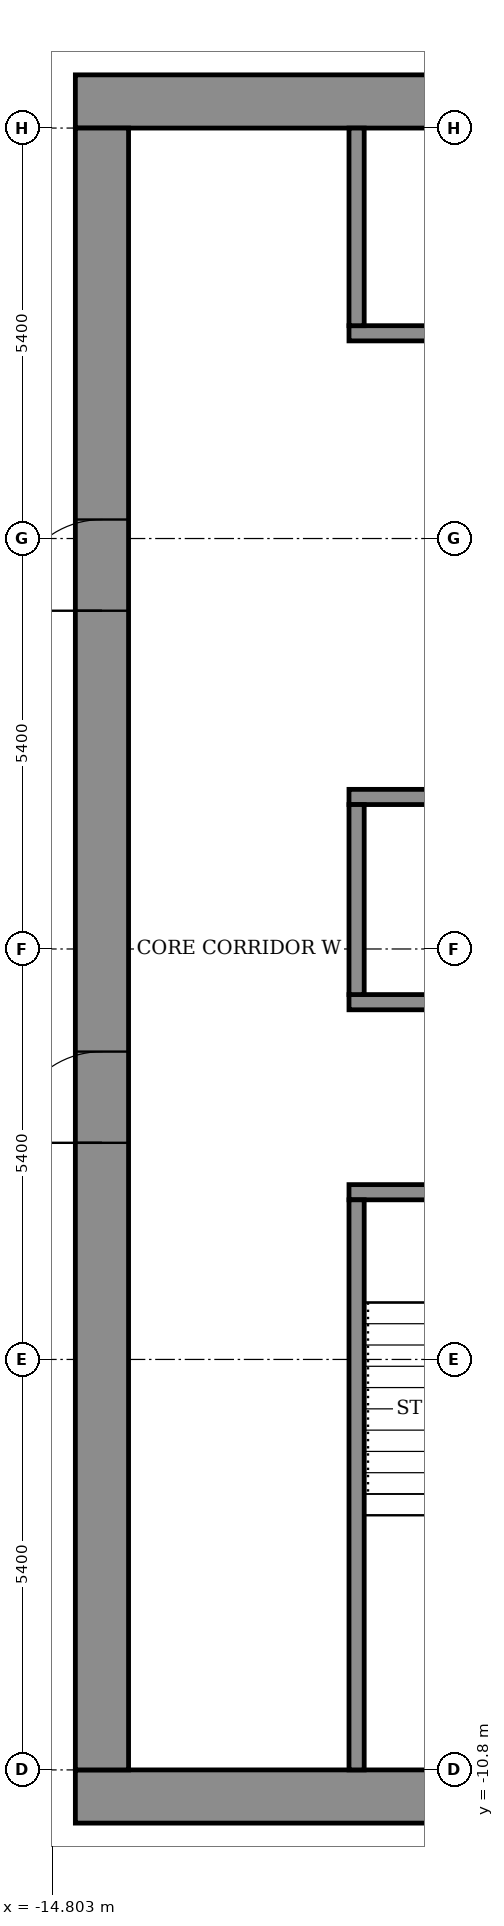
"""IFC4 building model, lengths in metres.
Left out: names, types, materials, properties, quantities, classifications, styles, units other than length and angle.
Written with IfcOpenShell. Run it as: python <this file> out.ifc"""

import sys

from ifc_helpers import new_model, si_unit, direction, frame, frame_2d, origin, place, context, subcontext, project, spatial, rectangle, extrude, element, fill, save


model = new_model("IFC4")
c1 = context("Model", 3, precision=1e-05, world=origin(), true_north=direction((0.0, 1.0)))
c2 = subcontext(c1, "Body", "Model", "MODEL_VIEW")
j1 = project(units=[si_unit("LENGTHUNIT", "METRE"), si_unit("PLANEANGLEUNIT", "RADIAN")], contexts=[c1])
p1 = place(None, origin())
s1 = spatial("IfcSite", under=j1, at=p1, CompositionType="ELEMENT")
p2 = place(p1, origin())
s2 = spatial("IfcBuilding", under=s1, at=p2, CompositionType="ELEMENT")
p3 = place(p2, frame((0.0, 0.0, 271.7)))
s3 = spatial("IfcBuildingStorey", under=s2, at=p3, CompositionType="ELEMENT", Elevation=271.7)
for number, where, z_axis, x_axis in (
    (1, (-14.5, -11.15, 0.0), (0.0, 0.0, 1.0), (1.0, 0.0, 0.0)),
    (2, (-14.5, 11.15, 0.0), (0.0, 0.0, 1.0), (1.0, 0.0, 0.0)),
):
    element("IfcWall", number, at=place(p3, frame(where, z_axis=z_axis, x_axis=x_axis)), inside=s3, PredefinedType="SHEAR", context=c2, shape_type="SweptSolid", body=[
        extrude(rectangle(XDim=29.0, YDim=0.7, at=frame_2d((14.5, 0.0))), origin(), (0.0, 0.0, 1.0), 3.6),
    ])
p4 = place(p3, frame((-14.15, -10.8, 0.0), z_axis=(0.0, 0.0, 1.0), x_axis=(0.0, 1.0, 0.0)))
e3 = element("IfcWall", 3, at=p4, inside=s3, PredefinedType="SHEAR", context=c2, shape_type="SweptSolid", body=[
    extrude(rectangle(XDim=21.6, YDim=0.7, at=frame_2d((10.8, 0.0))), origin(), (0.0, 0.0, 1.0), 3.6),
])
p5 = place(p4, frame((8.25, 0.0, 0.0)))
e4 = element("IfcOpeningElement", 4, at=p5, cuts=e3, PredefinedType="OPENING", context=c2, shape_type="SweptSolid", body=[
    extrude(rectangle(XDim=1.2, YDim=2.1, at=frame_2d((0.6, 1.05))), frame((0.0, 0.36, 0.0), z_axis=(0.0, -1.0, 0.0), x_axis=(1.0, 0.0, 0.0)), (0.0, 0.0, 1.0), 0.72),
])
p6 = place(p4, frame((15.25, 0.0, 0.0)))
e5 = element("IfcOpeningElement", 5, at=p6, cuts=e3, PredefinedType="OPENING", context=c2, shape_type="SweptSolid", body=[
    extrude(rectangle(XDim=1.2, YDim=2.1, at=frame_2d((0.6, 1.05))), frame((0.0, 0.36, 0.0), z_axis=(0.0, -1.0, 0.0), x_axis=(1.0, 0.0, 0.0)), (0.0, 0.0, 1.0), 0.72),
])
p7 = place(p3, frame((-10.9, -3.2, 0.0), z_axis=(0.0, 0.0, 1.0), x_axis=(1.0, 0.0, 0.0)))
e6 = element("IfcWall", 6, at=p7, inside=s3, PredefinedType="SHEAR", context=c2, shape_type="SweptSolid", body=[
    extrude(rectangle(XDim=21.8, YDim=0.2, at=frame_2d((10.9, 0.0))), origin(), (0.0, 0.0, 1.0), 3.05),
])
p8 = place(p7, frame((1.075, 0.0, 0.0)))
e7 = element("IfcOpeningElement", 7, at=p8, cuts=e6, PredefinedType="OPENING", context=c2, shape_type="SweptSolid", body=[
    extrude(rectangle(XDim=1.1, YDim=2.1, at=frame_2d((0.55, 1.05))), frame((0.0, 0.11, 0.0), z_axis=(0.0, -1.0, 0.0), x_axis=(1.0, 0.0, 0.0)), (0.0, 0.0, 1.0), 0.22),
])
p9 = place(p7, frame((10.325, 0.0, 0.0)))
e8 = element("IfcOpeningElement", 8, at=p9, cuts=e6, PredefinedType="OPENING", context=c2, shape_type="SweptSolid", body=[
    extrude(rectangle(XDim=1.1, YDim=2.1, at=frame_2d((0.55, 1.05))), frame((0.0, 0.11, 0.0), z_axis=(0.0, -1.0, 0.0), x_axis=(1.0, 0.0, 0.0)), (0.0, 0.0, 1.0), 0.22),
])
p10 = place(p7, frame((19.625, 0.0, 0.0)))
e9 = element("IfcOpeningElement", 9, at=p10, cuts=e6, PredefinedType="OPENING", context=c2, shape_type="SweptSolid", body=[
    extrude(rectangle(XDim=1.1, YDim=2.1, at=frame_2d((0.55, 1.05))), frame((0.0, 0.11, 0.0), z_axis=(0.0, -1.0, 0.0), x_axis=(1.0, 0.0, 0.0)), (0.0, 0.0, 1.0), 0.22),
])
p11 = place(p7, frame((5.7, 0.0, 0.0)))
e10 = element("IfcOpeningElement", 10, at=p11, cuts=e6, PredefinedType="OPENING", context=c2, shape_type="SweptSolid", body=[
    extrude(rectangle(XDim=1.1, YDim=2.1, at=frame_2d((0.55, 1.05))), frame((0.0, 0.11, 0.0), z_axis=(0.0, -1.0, 0.0), x_axis=(1.0, 0.0, 0.0)), (0.0, 0.0, 1.0), 0.22),
])
p12 = place(p7, frame((14.975, 0.0, 0.0)))
e11 = element("IfcOpeningElement", 11, at=p12, cuts=e6, PredefinedType="OPENING", context=c2, shape_type="SweptSolid", body=[
    extrude(rectangle(XDim=1.1, YDim=2.1, at=frame_2d((0.55, 1.05))), frame((0.0, 0.11, 0.0), z_axis=(0.0, -1.0, 0.0), x_axis=(1.0, 0.0, 0.0)), (0.0, 0.0, 1.0), 0.22),
])
p13 = place(p3, frame((-10.9, -0.7, 0.0), z_axis=(0.0, 0.0, 1.0), x_axis=(1.0, 0.0, 0.0)))
e12 = element("IfcWall", 12, at=p13, inside=s3, PredefinedType="SHEAR", context=c2, shape_type="SweptSolid", body=[
    extrude(rectangle(XDim=21.8, YDim=0.2, at=frame_2d((10.9, 0.0))), origin(), (0.0, 0.0, 1.0), 3.05),
])
p14 = place(p3, frame((-10.9, 2.0, 0.0), z_axis=(0.0, 0.0, 1.0), x_axis=(1.0, 0.0, 0.0)))
e13 = element("IfcWall", 13, at=p14, inside=s3, PredefinedType="SHEAR", context=c2, shape_type="SweptSolid", body=[
    extrude(rectangle(XDim=21.8, YDim=0.2, at=frame_2d((10.9, 0.0))), origin(), (0.0, 0.0, 1.0), 3.05),
])
p15 = place(p14, frame((4.95, 0.0, 0.0)))
e14 = element("IfcOpeningElement", 14, at=p15, cuts=e13, PredefinedType="OPENING", context=c2, shape_type="SweptSolid", body=[
    extrude(rectangle(XDim=1.1, YDim=2.1, at=frame_2d((0.55, 1.05))), frame((0.0, 0.11, 0.0), z_axis=(0.0, -1.0, 0.0), x_axis=(1.0, 0.0, 0.0)), (0.0, 0.0, 1.0), 0.22),
])
p16 = place(p14, frame((7.65, 0.0, 0.0)))
e15 = element("IfcOpeningElement", 15, at=p16, cuts=e13, PredefinedType="OPENING", context=c2, shape_type="SweptSolid", body=[
    extrude(rectangle(XDim=1.1, YDim=2.1, at=frame_2d((0.55, 1.05))), frame((0.0, 0.11, 0.0), z_axis=(0.0, -1.0, 0.0), x_axis=(1.0, 0.0, 0.0)), (0.0, 0.0, 1.0), 0.22),
])
p17 = place(p14, frame((10.35, 0.0, 0.0)))
e16 = element("IfcOpeningElement", 16, at=p17, cuts=e13, PredefinedType="OPENING", context=c2, shape_type="SweptSolid", body=[
    extrude(rectangle(XDim=1.1, YDim=2.1, at=frame_2d((0.55, 1.05))), frame((0.0, 0.11, 0.0), z_axis=(0.0, -1.0, 0.0), x_axis=(1.0, 0.0, 0.0)), (0.0, 0.0, 1.0), 0.22),
])
p18 = place(p14, frame((1.675, 0.0, 0.0)))
e17 = element("IfcOpeningElement", 17, at=p18, cuts=e13, PredefinedType="OPENING", context=c2, shape_type="SweptSolid", body=[
    extrude(rectangle(XDim=0.9, YDim=2.1, at=frame_2d((0.45, 1.05))), frame((0.0, 0.11, 0.0), z_axis=(0.0, -1.0, 0.0), x_axis=(1.0, 0.0, 0.0)), (0.0, 0.0, 1.0), 0.22),
])
p19 = place(p14, frame((13.825, 0.0, 0.0)))
e18 = element("IfcOpeningElement", 18, at=p19, cuts=e13, PredefinedType="OPENING", context=c2, shape_type="SweptSolid", body=[
    extrude(rectangle(XDim=0.9, YDim=2.1, at=frame_2d((0.45, 1.05))), frame((0.0, 0.11, 0.0), z_axis=(0.0, -1.0, 0.0), x_axis=(1.0, 0.0, 0.0)), (0.0, 0.0, 1.0), 0.22),
])
p20 = place(p14, frame((18.55, 0.0, 0.0)))
e19 = element("IfcOpeningElement", 19, at=p20, cuts=e13, PredefinedType="OPENING", context=c2, shape_type="SweptSolid", body=[
    extrude(rectangle(XDim=0.9, YDim=2.1, at=frame_2d((0.45, 1.05))), frame((0.0, 0.11, 0.0), z_axis=(0.0, -1.0, 0.0), x_axis=(1.0, 0.0, 0.0)), (0.0, 0.0, 1.0), 0.22),
])
p21 = place(p3, frame((-10.9, 8.1, 0.0), z_axis=(0.0, 0.0, 1.0), x_axis=(1.0, 0.0, 0.0)))
e20 = element("IfcWall", 20, at=p21, inside=s3, PredefinedType="SHEAR", context=c2, shape_type="SweptSolid", body=[
    extrude(rectangle(XDim=21.8, YDim=0.2, at=frame_2d((10.9, 0.0))), origin(), (0.0, 0.0, 1.0), 3.05),
])
p22 = place(p21, frame((4.95, 0.0, 0.0)))
e21 = element("IfcOpeningElement", 21, at=p22, cuts=e20, PredefinedType="OPENING", context=c2, shape_type="SweptSolid", body=[
    extrude(rectangle(XDim=1.1, YDim=2.1, at=frame_2d((0.55, 1.05))), frame((0.0, 0.11, 0.0), z_axis=(0.0, -1.0, 0.0), x_axis=(1.0, 0.0, 0.0)), (0.0, 0.0, 1.0), 0.22),
])
p23 = place(p21, frame((7.65, 0.0, 0.0)))
e22 = element("IfcOpeningElement", 22, at=p23, cuts=e20, PredefinedType="OPENING", context=c2, shape_type="SweptSolid", body=[
    extrude(rectangle(XDim=1.1, YDim=2.1, at=frame_2d((0.55, 1.05))), frame((0.0, 0.11, 0.0), z_axis=(0.0, -1.0, 0.0), x_axis=(1.0, 0.0, 0.0)), (0.0, 0.0, 1.0), 0.22),
])
p24 = place(p21, frame((10.35, 0.0, 0.0)))
e23 = element("IfcOpeningElement", 23, at=p24, cuts=e20, PredefinedType="OPENING", context=c2, shape_type="SweptSolid", body=[
    extrude(rectangle(XDim=1.1, YDim=2.1, at=frame_2d((0.55, 1.05))), frame((0.0, 0.11, 0.0), z_axis=(0.0, -1.0, 0.0), x_axis=(1.0, 0.0, 0.0)), (0.0, 0.0, 1.0), 0.22),
])
p25 = place(p21, frame((1.675, 0.0, 0.0)))
e24 = element("IfcOpeningElement", 24, at=p25, cuts=e20, PredefinedType="OPENING", context=c2, shape_type="SweptSolid", body=[
    extrude(rectangle(XDim=0.9, YDim=2.1, at=frame_2d((0.45, 1.05))), frame((0.0, 0.11, 0.0), z_axis=(0.0, -1.0, 0.0), x_axis=(1.0, 0.0, 0.0)), (0.0, 0.0, 1.0), 0.22),
])
p26 = place(p21, frame((13.825, 0.0, 0.0)))
e25 = element("IfcOpeningElement", 25, at=p26, cuts=e20, PredefinedType="OPENING", context=c2, shape_type="SweptSolid", body=[
    extrude(rectangle(XDim=0.9, YDim=2.1, at=frame_2d((0.45, 1.05))), frame((0.0, 0.11, 0.0), z_axis=(0.0, -1.0, 0.0), x_axis=(1.0, 0.0, 0.0)), (0.0, 0.0, 1.0), 0.22),
])
p27 = place(p21, frame((18.55, 0.0, 0.0)))
e26 = element("IfcOpeningElement", 26, at=p27, cuts=e20, PredefinedType="OPENING", context=c2, shape_type="SweptSolid", body=[
    extrude(rectangle(XDim=0.9, YDim=2.1, at=frame_2d((0.45, 1.05))), frame((0.0, 0.11, 0.0), z_axis=(0.0, -1.0, 0.0), x_axis=(1.0, 0.0, 0.0)), (0.0, 0.0, 1.0), 0.22),
])
p28 = place(p3, frame((-10.8, -10.8, 0.0), z_axis=(0.0, 0.0, 1.0), x_axis=(0.0, 1.0, 0.0)))
e27 = element("IfcWall", 27, at=p28, inside=s3, PredefinedType="SHEAR", context=c2, shape_type="SweptSolid", body=[
    extrude(rectangle(XDim=7.5, YDim=0.2, at=frame_2d((3.75, 0.0))), origin(), (0.0, 0.0, 1.0), 3.05),
])
p29 = place(p3, frame((-10.8, -0.6, 0.0), z_axis=(0.0, 0.0, 1.0), x_axis=(0.0, 1.0, 0.0)))
e28 = element("IfcWall", 28, at=p29, inside=s3, PredefinedType="STANDARD", context=c2, shape_type="SweptSolid", body=[
    extrude(rectangle(XDim=2.5, YDim=0.2, at=frame_2d((1.25, 0.0))), origin(), (0.0, 0.0, 1.0), 3.05),
])
p30 = place(p3, frame((-10.8, 8.2, 0.0), z_axis=(0.0, 0.0, 1.0), x_axis=(0.0, 1.0, 0.0)))
e29 = element("IfcWall", 29, at=p30, inside=s3, PredefinedType="STANDARD", context=c2, shape_type="SweptSolid", body=[
    extrude(rectangle(XDim=2.6, YDim=0.2, at=frame_2d((1.3, 0.0))), origin(), (0.0, 0.0, 1.0), 3.05),
])
p31 = place(p5, origin())
e30 = element("IfcDoor", 30, at=p31, inside=s3, OperationType="DOUBLE_DOOR_SINGLE_SWING", PredefinedType="DOOR", context=c2, shape_type="SweptSolid", body=[
    extrude(rectangle(XDim=1.2, YDim=2.1, at=frame_2d((0.6, 1.05))), frame((0.0, 0.025, 0.0), z_axis=(0.0, -1.0, 0.0), x_axis=(1.0, 0.0, 0.0)), (0.0, 0.0, 1.0), 0.05),
])
fill(e4, e30)
p32 = place(p6, origin())
e31 = element("IfcDoor", 31, at=p32, inside=s3, OperationType="DOUBLE_DOOR_SINGLE_SWING", PredefinedType="DOOR", context=c2, shape_type="SweptSolid", body=[
    extrude(rectangle(XDim=1.2, YDim=2.1, at=frame_2d((0.6, 1.05))), frame((0.0, 0.025, 0.0), z_axis=(0.0, -1.0, 0.0), x_axis=(1.0, 0.0, 0.0)), (0.0, 0.0, 1.0), 0.05),
])
fill(e5, e31)
save(model, sys.argv[1])
